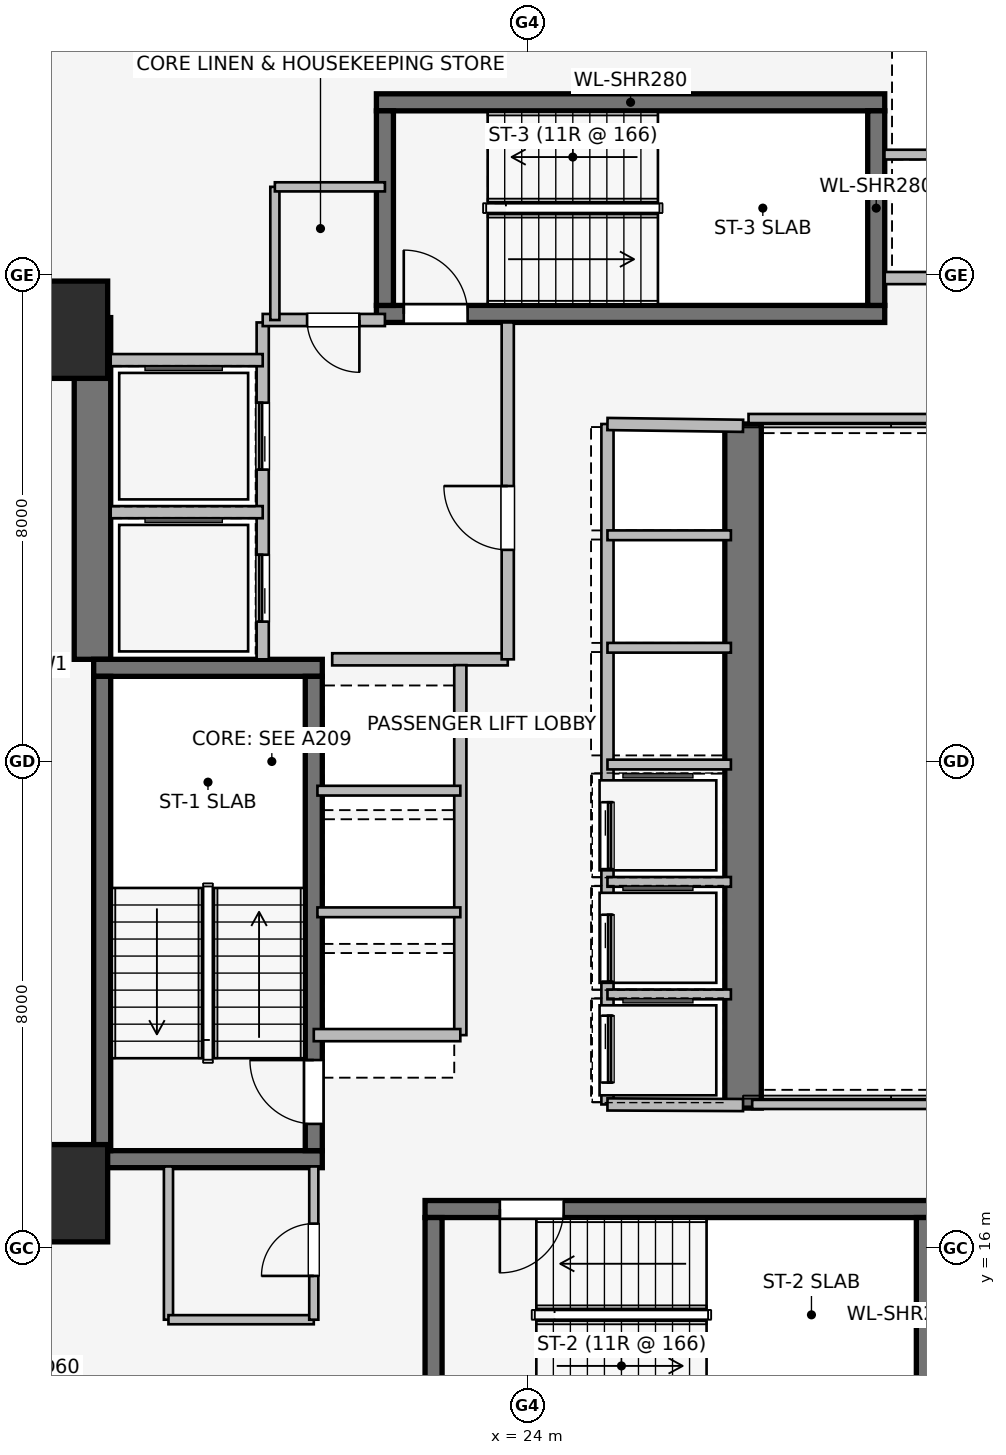
"""IFC4 building model, lengths in metres.
Left out: names, types, materials, properties, quantities, classifications, styles, units other than length and angle.
Written with IfcOpenShell. Run it as: python <this file> out.ifc"""

import sys

from ifc_helpers import new_model, si_unit, direction, frame, frame_2d, origin, origin_2d, place, context, subcontext, project, spatial, rectangle, extrude, element, fill, save


model = new_model("IFC4")
c1 = context("Model", 3, precision=1e-05, world=origin(), true_north=direction((0.0, 1.0)))
c2 = subcontext(c1, "Body", "Model", "MODEL_VIEW")
j1 = project(units=[si_unit("LENGTHUNIT", "METRE"), si_unit("PLANEANGLEUNIT", "RADIAN")], contexts=[c1])
p1 = place(None, origin())
s1 = spatial("IfcSite", under=j1, at=p1, CompositionType="ELEMENT")
p2 = place(p1, origin())
s2 = spatial("IfcBuilding", under=s1, at=p2, CompositionType="ELEMENT")
p3 = place(p2, frame((0.0, 0.0, 30.65)))
s3 = spatial("IfcBuildingStorey", under=s2, at=p3, CompositionType="ELEMENT", Elevation=30.65)
p4 = place(p3, frame((16.85, 25.68, 0.0), z_axis=(0.0, 0.0, 1.0), x_axis=(0.0, 1.0, 0.0)))
e1 = element("IfcWall", 1, at=p4, inside=s3, PredefinedType="SHEAR", context=c2, shape_type="SweptSolid", body=[
    extrude(rectangle(XDim=5.62, YDim=0.6, at=frame_2d((2.81, 0.0))), origin(), (0.0, 0.0, 1.0), 3.65),
])
p5 = place(p3, frame((27.55, 29.55, 0.0), z_axis=(0.0, 0.0, 1.0), x_axis=(0.0, -1.0, 0.0)))
e2 = element("IfcWall", 2, at=p5, inside=s3, PredefinedType="SHEAR", context=c2, shape_type="SweptSolid", body=[
    extrude(rectangle(XDim=11.25, YDim=0.6, at=frame_2d((5.625, 0.0))), origin(), (0.0, 0.0, 1.0), 3.65),
])
for number, where, z_axis, x_axis in (
    (3, (16.87, 17.46, 0.0), (0.0, 0.0, 1.0), (1.0, 0.0, 0.0)),
    (4, (20.63, 25.54, 0.0), (0.0, 0.0, 1.0), (-1.0, 0.0, 0.0)),
):
    element("IfcWall", number, at=place(p3, frame(where, z_axis=z_axis, x_axis=x_axis)), inside=s3, PredefinedType="SHEAR", context=c2, shape_type="SweptSolid", body=[
        extrude(rectangle(XDim=3.76, YDim=0.28, at=frame_2d((1.88, 0.0))), origin(), (0.0, 0.0, 1.0), 3.65),
    ])
p6 = place(p3, frame((17.01, 25.4, 0.0), z_axis=(0.0, 0.0, 1.0), x_axis=(0.0, -1.0, 0.0)))
e5 = element("IfcWall", 5, at=p6, inside=s3, PredefinedType="SHEAR", context=c2, shape_type="SweptSolid", body=[
    extrude(rectangle(XDim=7.8, YDim=0.28, at=frame_2d((3.9, 0.0))), origin(), (0.0, 0.0, 1.0), 3.65),
])
p7 = place(p3, frame((20.49, 17.6, 0.0), z_axis=(0.0, 0.0, 1.0), x_axis=(0.0, 1.0, 0.0)))
e6 = element("IfcWall", 6, at=p7, inside=s3, PredefinedType="SHEAR", context=c2, shape_type="SweptSolid", body=[
    extrude(rectangle(XDim=7.8, YDim=0.28, at=frame_2d((3.9, 0.0))), origin(), (0.0, 0.0, 1.0), 3.65),
])
p8 = place(p7, frame((0.44, 0.0, 0.0)))
e7 = element("IfcOpeningElement", 7, at=p8, cuts=e6, PredefinedType="OPENING", context=c2, shape_type="SweptSolid", body=[
    extrude(rectangle(XDim=1.05, YDim=2.0, at=frame_2d((0.525, 1.0))), frame((0.0, 0.15, 0.0), z_axis=(0.0, -1.0, 0.0), x_axis=(1.0, 0.0, 0.0)), (0.0, 0.0, 1.0), 0.3),
])
p9 = place(p3, frame((30.68, 16.64, 0.0), z_axis=(0.0, 0.0, 1.0), x_axis=(-1.0, 0.0, 0.0)))
e8 = element("IfcWall", 8, at=p9, inside=s3, PredefinedType="SHEAR", context=c2, shape_type="SweptSolid", body=[
    extrude(rectangle(XDim=8.36, YDim=0.28, at=frame_2d((4.18, 0.0))), origin(), (0.0, 0.0, 1.0), 3.65),
])
p10 = place(p9, frame((6.08, 0.0, 0.0)))
e9 = element("IfcOpeningElement", 9, at=p10, cuts=e8, PredefinedType="OPENING", context=c2, shape_type="SweptSolid", body=[
    extrude(rectangle(XDim=1.05, YDim=2.0, at=frame_2d((0.525, 1.0))), frame((0.0, 0.15, 0.0), z_axis=(0.0, -1.0, 0.0), x_axis=(1.0, 0.0, 0.0)), (0.0, 0.0, 1.0), 0.3),
])
for number, where, z_axis, x_axis in (
    (10, (22.46, 16.5, 0.0), (0.0, 0.0, 1.0), (0.0, -1.0, 0.0)),
    (11, (30.54, 13.3, 0.0), (0.0, 0.0, 1.0), (0.0, 1.0, 0.0)),
):
    element("IfcWall", number, at=place(p3, frame(where, z_axis=z_axis, x_axis=x_axis)), inside=s3, PredefinedType="SHEAR", context=c2, shape_type="SweptSolid", body=[
        extrude(rectangle(XDim=3.2, YDim=0.28, at=frame_2d((1.6, 0.0))), origin(), (0.0, 0.0, 1.0), 3.65),
    ])
p11 = place(p3, frame((21.52, 31.36, 0.0), z_axis=(0.0, 0.0, 1.0), x_axis=(1.0, 0.0, 0.0)))
e12 = element("IfcWall", 12, at=p11, inside=s3, PredefinedType="SHEAR", context=c2, shape_type="SweptSolid", body=[
    extrude(rectangle(XDim=8.36, YDim=0.28, at=frame_2d((4.18, 0.0))), origin(), (0.0, 0.0, 1.0), 3.65),
])
p12 = place(p11, frame((0.45, 0.0, 0.0)))
e13 = element("IfcOpeningElement", 13, at=p12, cuts=e12, PredefinedType="OPENING", context=c2, shape_type="SweptSolid", body=[
    extrude(rectangle(XDim=1.05, YDim=2.0, at=frame_2d((0.525, 1.0))), frame((0.0, 0.15, 0.0), z_axis=(0.0, -1.0, 0.0), x_axis=(1.0, 0.0, 0.0)), (0.0, 0.0, 1.0), 0.3),
])
p13 = place(p3, frame((29.88, 34.84, 0.0), z_axis=(0.0, 0.0, 1.0), x_axis=(-1.0, 0.0, 0.0)))
e14 = element("IfcWall", 14, at=p13, inside=s3, PredefinedType="SHEAR", context=c2, shape_type="SweptSolid", body=[
    extrude(rectangle(XDim=8.36, YDim=0.28, at=frame_2d((4.18, 0.0))), origin(), (0.0, 0.0, 1.0), 3.65),
])
for number, where, z_axis, x_axis in (
    (15, (21.66, 34.7, 0.0), (0.0, 0.0, 1.0), (0.0, -1.0, 0.0)),
    (16, (29.74, 31.5, 0.0), (0.0, 0.0, 1.0), (0.0, 1.0, 0.0)),
):
    element("IfcWall", number, at=place(p3, frame(where, z_axis=z_axis, x_axis=x_axis)), inside=s3, PredefinedType="SHEAR", context=c2, shape_type="SweptSolid", body=[
        extrude(rectangle(XDim=3.2, YDim=0.28, at=frame_2d((1.6, 0.0))), origin(), (0.0, 0.0, 1.0), 3.65),
    ])
for number, where, z_axis, x_axis in (
    (17, (16.3, 16.9, 0.0), (0.0, 0.0, 1.0), (1.0, 0.0, 0.0)),
    (18, (16.3, 31.1, 0.0), (0.0, 0.0, 1.0), (1.0, 0.0, 0.0)),
):
    element("IfcColumn", number, at=place(p3, frame(where, z_axis=z_axis, x_axis=x_axis)), inside=s3, PredefinedType="COLUMN", context=c2, shape_type="SweptSolid", body=[
        extrude(rectangle(XDim=1.6, YDim=1.6, at=origin_2d()), origin(), (0.0, 0.0, 1.0), 3.65),
    ])
p14 = place(p3, frame((19.65, 25.68, 0.0), z_axis=(0.0, 0.0, 1.0), x_axis=(0.0, 1.0, 0.0)))
e19 = element("IfcWall", 19, at=p14, inside=s3, PredefinedType="PARTITIONING", context=c2, shape_type="SweptSolid", body=[
    extrude(rectangle(XDim=5.54, YDim=0.2, at=frame_2d((2.77, 0.0))), origin(), (0.0, 0.0, 1.0), 3.39),
])
p15 = place(p14, frame((0.62, 0.0, 0.0)))
e20 = element("IfcOpeningElement", 20, at=p15, cuts=e19, PredefinedType="OPENING", context=c2, shape_type="SweptSolid", body=[
    extrude(rectangle(XDim=1.1, YDim=2.2, at=frame_2d((0.55, 1.1))), frame((0.0, 0.11, 0.0), z_axis=(0.0, -1.0, 0.0), x_axis=(1.0, 0.0, 0.0)), (0.0, 0.0, 1.0), 0.22),
])
p16 = place(p14, frame((3.12, 0.0, 0.0)))
e21 = element("IfcOpeningElement", 21, at=p16, cuts=e19, PredefinedType="OPENING", context=c2, shape_type="SweptSolid", body=[
    extrude(rectangle(XDim=1.1, YDim=2.2, at=frame_2d((0.55, 1.1))), frame((0.0, 0.11, 0.0), z_axis=(0.0, -1.0, 0.0), x_axis=(1.0, 0.0, 0.0)), (0.0, 0.0, 1.0), 0.22),
])
p17 = place(p3, frame((20.793, 25.68, 0.0), z_axis=(0.0, 0.0, 1.0), x_axis=(1.0, 0.0, 0.0)))
e22 = element("IfcWall", 22, at=p17, inside=s3, PredefinedType="PARTITIONING", context=c2, shape_type="SweptSolid", body=[
    extrude(rectangle(XDim=2.887, YDim=0.2, at=frame_2d((1.443, 0.0))), origin(), (0.0, 0.0, 1.0), 3.39),
])
p18 = place(p3, frame((23.68, 25.68, 0.0), z_axis=(0.0, 0.0, 1.0), x_axis=(0.0, 1.0, 0.0)))
e23 = element("IfcWall", 23, at=p18, inside=s3, PredefinedType="PARTITIONING", context=c2, shape_type="SweptSolid", body=[
    extrude(rectangle(XDim=5.54, YDim=0.2, at=frame_2d((2.77, 0.0))), origin(), (0.0, 0.0, 1.0), 3.39),
])
p19 = place(p18, frame((1.8, 0.0, 0.0)))
e24 = element("IfcOpeningElement", 24, at=p19, cuts=e23, PredefinedType="OPENING", context=c2, shape_type="SweptSolid", body=[
    extrude(rectangle(XDim=1.05, YDim=2.0, at=frame_2d((0.525, 1.0))), frame((0.0, 0.11, 0.0), z_axis=(0.0, -1.0, 0.0), x_axis=(1.0, 0.0, 0.0)), (0.0, 0.0, 1.0), 0.22),
])
p20 = place(p3, frame((21.66, 31.26, 0.0), z_axis=(0.0, 0.0, 1.0), x_axis=(-1.0, 0.0, 0.0)))
e25 = element("IfcWall", 25, at=p20, inside=s3, PredefinedType="PARTITIONING", context=c2, shape_type="SweptSolid", body=[
    extrude(rectangle(XDim=2.01, YDim=0.2, at=frame_2d((1.005, 0.0))), origin(), (0.0, 0.0, 1.0), 3.39),
])
p21 = place(p20, frame((0.42, 0.0, 0.0)))
e26 = element("IfcOpeningElement", 26, at=p21, cuts=e25, PredefinedType="OPENING", context=c2, shape_type="SweptSolid", body=[
    extrude(rectangle(XDim=0.86, YDim=2.0, at=frame_2d((0.43, 1.0))), frame((0.0, 0.11, 0.0), z_axis=(0.0, -1.0, 0.0), x_axis=(1.0, 0.0, 0.0)), (0.0, 0.0, 1.0), 0.22),
])
p22 = place(p3, frame((17.15, 28.1, 0.0), z_axis=(0.0, 0.0, 1.0), x_axis=(1.0, 0.0, 0.0)))
e27 = element("IfcWall", 27, at=p22, inside=s3, PredefinedType="PARTITIONING", context=c2, shape_type="SweptSolid", body=[
    extrude(rectangle(XDim=2.5, YDim=0.2, at=frame_2d((1.25, 0.0))), origin(), (0.0, 0.0, 1.0), 3.39),
])
p23 = place(p3, frame((19.65, 30.6, 0.0), z_axis=(0.0, 0.0, 1.0), x_axis=(-1.0, 0.0, 0.0)))
e28 = element("IfcWall", 28, at=p23, inside=s3, PredefinedType="PARTITIONING", context=c2, shape_type="SweptSolid", body=[
    extrude(rectangle(XDim=2.5, YDim=0.2, at=frame_2d((1.25, 0.0))), origin(), (0.0, 0.0, 1.0), 2.29),
])
p24 = place(p3, frame((32.48, 31.95, 0.0), z_axis=(0.0, 0.0, 1.0), x_axis=(-1.0, 0.0, 0.0)))
e29 = element("IfcWall", 29, at=p24, inside=s3, PredefinedType="PARTITIONING", context=c2, shape_type="SweptSolid", body=[
    extrude(rectangle(XDim=2.6, YDim=0.2, at=frame_2d((1.3, 0.0))), origin(), (0.0, 0.0, 1.0), 3.39),
])
p25 = place(p3, frame((29.875, 33.98, 0.0), z_axis=(0.0, 0.0, 1.0), x_axis=(1.0, 0.0, 0.0)))
e30 = element("IfcWall", 30, at=p25, inside=s3, PredefinedType="PARTITIONING", context=c2, shape_type="SweptSolid", body=[
    extrude(rectangle(XDim=2.605, YDim=0.16, at=frame_2d((1.302, 0.0))), origin(), (0.0, 0.0, 1.0), 3.39),
])
p26 = place(p3, frame((22.9, 19.5, 0.0), z_axis=(0.0, 0.0, 1.0), x_axis=(0.0, 1.0, 0.0)))
e31 = element("IfcWall", 31, at=p26, inside=s3, PredefinedType="PARTITIONING", context=c2, shape_type="SweptSolid", body=[
    extrude(rectangle(XDim=6.085, YDim=0.2, at=frame_2d((3.042, 0.0))), origin(), (0.0, 0.0, 1.0), 3.39),
])
p27 = place(p3, frame((20.49, 19.5, 0.0), z_axis=(0.0, 0.0, 1.0), x_axis=(1.0, 0.0, 0.0)))
e32 = element("IfcWall", 32, at=p27, inside=s3, PredefinedType="PARTITIONING", context=c2, shape_type="SweptSolid", body=[
    extrude(rectangle(XDim=2.41, YDim=0.2, at=frame_2d((1.205, 0.0))), origin(), (0.0, 0.0, 1.0), 2.29),
])
for number, where, z_axis, x_axis in (
    (33, (20.55, 21.52, 0.0), (0.0, 0.0, 1.0), (1.0, 0.0, 0.0)),
    (34, (20.55, 23.52, 0.0), (0.0, 0.0, 1.0), (1.0, 0.0, 0.0)),
):
    element("IfcWall", number, at=place(p3, frame(where, z_axis=z_axis, x_axis=x_axis)), inside=s3, PredefinedType="PARTITIONING", context=c2, shape_type="SweptSolid", body=[
        extrude(rectangle(XDim=2.35, YDim=0.16, at=frame_2d((1.175, 0.0))), origin(), (0.0, 0.0, 1.0), 3.39),
    ])
p28 = place(p3, frame((25.32, 29.55, 0.0), z_axis=(0.0, 0.0, 1.0), x_axis=(0.0, -1.0, 0.0)))
e35 = element("IfcWall", 35, at=p28, inside=s3, PredefinedType="PARTITIONING", context=c2, shape_type="SweptSolid", body=[
    extrude(rectangle(XDim=11.19, YDim=0.2, at=frame_2d((5.595, 0.0))), origin(), (0.0, 0.0, 1.0), 3.39),
])
p29 = place(p28, frame((6.22, 0.0, 0.0)))
e36 = element("IfcOpeningElement", 36, at=p29, cuts=e35, PredefinedType="OPENING", context=c2, shape_type="SweptSolid", body=[
    extrude(rectangle(XDim=1.1, YDim=2.2, at=frame_2d((0.55, 1.1))), frame((0.0, 0.11, 0.0), z_axis=(0.0, -1.0, 0.0), x_axis=(1.0, 0.0, 0.0)), (0.0, 0.0, 1.0), 0.22),
])
p30 = place(p28, frame((8.07, 0.0, 0.0)))
e37 = element("IfcOpeningElement", 37, at=p30, cuts=e35, PredefinedType="OPENING", context=c2, shape_type="SweptSolid", body=[
    extrude(rectangle(XDim=1.1, YDim=2.2, at=frame_2d((0.55, 1.1))), frame((0.0, 0.11, 0.0), z_axis=(0.0, -1.0, 0.0), x_axis=(1.0, 0.0, 0.0)), (0.0, 0.0, 1.0), 0.22),
])
p31 = place(p28, frame((9.73, 0.0, 0.0)))
e38 = element("IfcOpeningElement", 38, at=p31, cuts=e35, PredefinedType="OPENING", context=c2, shape_type="SweptSolid", body=[
    extrude(rectangle(XDim=1.1, YDim=2.2, at=frame_2d((0.55, 1.1))), frame((0.0, 0.11, 0.0), z_axis=(0.0, -1.0, 0.0), x_axis=(1.0, 0.0, 0.0)), (0.0, 0.0, 1.0), 0.22),
])
p32 = place(p3, frame((25.32, 18.36, 0.0), z_axis=(0.0, 0.0, 1.0), x_axis=(0.999989925833, -0.004488678231, 0.0)))
e39 = element("IfcWall", 39, at=p32, inside=s3, PredefinedType="PARTITIONING", context=c2, shape_type="SweptSolid", body=[
    extrude(rectangle(XDim=2.23, YDim=0.2, at=frame_2d((1.115, 0.0))), origin(), (0.0, 0.0, 1.0), 3.39),
])
p33 = place(p3, frame((27.55, 29.52, 0.0), z_axis=(0.0, 0.0, 1.0), x_axis=(-0.999909343457, 0.013464949556, 0.0)))
e40 = element("IfcWall", 40, at=p33, inside=s3, PredefinedType="PARTITIONING", context=c2, shape_type="SweptSolid", body=[
    extrude(rectangle(XDim=2.23, YDim=0.2, at=frame_2d((1.115, 0.0))), origin(), (0.0, 0.0, 1.0), 2.29),
])
for number, where, z_axis, x_axis in (
    (41, (25.32, 20.17, 0.0), (0.0, 0.0, 1.0), (1.0, 0.0, 0.0)),
    (42, (25.32, 22.02, 0.0), (0.0, 0.0, 1.0), (1.0, 0.0, 0.0)),
    (43, (25.32, 23.95, 0.0), (0.0, 0.0, 1.0), (1.0, 0.0, 0.0)),
    (44, (25.32, 25.87, 0.0), (0.0, 0.0, 1.0), (1.0, 0.0, 0.0)),
    (45, (25.32, 27.72, 0.0), (0.0, 0.0, 1.0), (1.0, 0.0, 0.0)),
):
    element("IfcWall", number, at=place(p3, frame(where, z_axis=z_axis, x_axis=x_axis)), inside=s3, PredefinedType="PARTITIONING", context=c2, shape_type="SweptSolid", body=[
        extrude(rectangle(XDim=2.03, YDim=0.16, at=frame_2d((1.015, 0.0))), origin(), (0.0, 0.0, 1.0), 3.39),
    ])
p34 = place(p3, frame((18.1, 17.34, 0.0), z_axis=(0.0, 0.0, 1.0), x_axis=(0.0, -1.0, 0.0)))
e46 = element("IfcWall", 46, at=p34, inside=s3, PredefinedType="PARTITIONING", context=c2, shape_type="SweptSolid", body=[
    extrude(rectangle(XDim=2.52, YDim=0.15, at=frame_2d((1.26, 0.0))), origin(), (0.0, 0.0, 1.0), 3.39),
])
p35 = place(p3, frame((18.1, 14.82, 0.0), z_axis=(0.0, 0.0, 1.0), x_axis=(1.0, 0.0, 0.0)))
e47 = element("IfcWall", 47, at=p35, inside=s3, PredefinedType="PARTITIONING", context=c2, shape_type="SweptSolid", body=[
    extrude(rectangle(XDim=2.39, YDim=0.15, at=frame_2d((1.195, 0.0))), origin(), (0.0, 0.0, 1.0), 3.39),
])
p36 = place(p3, frame((20.49, 14.82, 0.0), z_axis=(0.0, 0.0, 1.0), x_axis=(0.0, 1.0, 0.0)))
e48 = element("IfcWall", 48, at=p36, inside=s3, PredefinedType="PARTITIONING", context=c2, shape_type="SweptSolid", body=[
    extrude(rectangle(XDim=2.52, YDim=0.15, at=frame_2d((1.26, 0.0))), origin(), (0.0, 0.0, 1.0), 3.39),
])
p37 = place(p36, frame((0.72, 0.0, 0.0)))
e49 = element("IfcOpeningElement", 49, at=p37, cuts=e48, PredefinedType="OPENING", context=c2, shape_type="SweptSolid", body=[
    extrude(rectangle(XDim=0.86, YDim=2.0, at=frame_2d((0.43, 1.0))), frame((0.0, 0.085, 0.0), z_axis=(0.0, -1.0, 0.0), x_axis=(1.0, 0.0, 0.0)), (0.0, 0.0, 1.0), 0.17),
])
p38 = place(p3, frame((19.85, 33.45, 0.0), z_axis=(0.0, 0.0, 1.0), x_axis=(0.0, -1.0, 0.0)))
e50 = element("IfcWall", 50, at=p38, inside=s3, PredefinedType="PARTITIONING", context=c2, shape_type="SweptSolid", body=[
    extrude(rectangle(XDim=2.19, YDim=0.15, at=frame_2d((1.095, 0.0))), origin(), (0.0, 0.0, 1.0), 3.39),
])
p39 = place(p3, frame((21.66, 33.45, 0.0), z_axis=(0.0, 0.0, 1.0), x_axis=(-1.0, 0.0, 0.0)))
e51 = element("IfcWall", 51, at=p39, inside=s3, PredefinedType="PARTITIONING", context=c2, shape_type="SweptSolid", body=[
    extrude(rectangle(XDim=1.81, YDim=0.15, at=frame_2d((0.905, 0.0))), origin(), (0.0, 0.0, 1.0), 3.39),
])
p40 = place(p3, frame((27.7, 18.36, 0.0), z_axis=(0.0, 0.0, 1.0), x_axis=(1.0, 0.0, 0.0)))
e52 = element("IfcWall", 52, at=p40, inside=s3, PredefinedType="PARTITIONING", context=c2, shape_type="SweptSolid", body=[
    extrude(rectangle(XDim=12.14, YDim=0.15, at=frame_2d((6.07, 0.0))), origin(), (0.0, 0.0, 1.0), 2.531),
])
p41 = place(p3, frame((39.84, 29.64, 0.0), z_axis=(0.0, 0.0, 1.0), x_axis=(-1.0, 0.0, 0.0)))
e53 = element("IfcWall", 53, at=p41, inside=s3, PredefinedType="PARTITIONING", context=c2, shape_type="SweptSolid", body=[
    extrude(rectangle(XDim=12.2, YDim=0.15, at=frame_2d((6.1, 0.0))), origin(), (0.0, 0.0, 1.0), 2.531),
])
p42 = place(p8, origin())
e54 = element("IfcDoor", 54, at=p42, inside=s3, OperationType="SINGLE_SWING_RIGHT", PredefinedType="DOOR", context=c2, shape_type="SweptSolid", body=[
    extrude(rectangle(XDim=1.05, YDim=2.0, at=frame_2d((0.525, 1.0))), frame((0.0, 0.025, 0.0), z_axis=(0.0, -1.0, 0.0), x_axis=(1.0, 0.0, 0.0)), (0.0, 0.0, 1.0), 0.05),
])
fill(e7, e54)
p43 = place(p10, origin())
e55 = element("IfcDoor", 55, at=p43, inside=s3, OperationType="SINGLE_SWING_RIGHT", PredefinedType="DOOR", context=c2, shape_type="SweptSolid", body=[
    extrude(rectangle(XDim=1.05, YDim=2.0, at=frame_2d((0.525, 1.0))), frame((0.0, 0.025, 0.0), z_axis=(0.0, -1.0, 0.0), x_axis=(1.0, 0.0, 0.0)), (0.0, 0.0, 1.0), 0.05),
])
fill(e9, e55)
p44 = place(p12, origin())
e56 = element("IfcDoor", 56, at=p44, inside=s3, OperationType="SINGLE_SWING_LEFT", PredefinedType="DOOR", context=c2, shape_type="SweptSolid", body=[
    extrude(rectangle(XDim=1.05, YDim=2.0, at=frame_2d((0.525, 1.0))), frame((0.0, 0.025, 0.0), z_axis=(0.0, -1.0, 0.0), x_axis=(1.0, 0.0, 0.0)), (0.0, 0.0, 1.0), 0.05),
])
fill(e13, e56)
p45 = place(p15, origin())
e57 = element("IfcDoor", 57, at=p45, inside=s3, OperationType="SLIDING_TO_LEFT", PredefinedType="DOOR", context=c2, shape_type="SweptSolid", body=[
    extrude(rectangle(XDim=1.1, YDim=2.2, at=frame_2d((0.55, 1.1))), frame((0.0, 0.025, 0.0), z_axis=(0.0, -1.0, 0.0), x_axis=(1.0, 0.0, 0.0)), (0.0, 0.0, 1.0), 0.05),
])
fill(e20, e57)
p46 = place(p16, origin())
e58 = element("IfcDoor", 58, at=p46, inside=s3, OperationType="SLIDING_TO_LEFT", PredefinedType="DOOR", context=c2, shape_type="SweptSolid", body=[
    extrude(rectangle(XDim=1.1, YDim=2.2, at=frame_2d((0.55, 1.1))), frame((0.0, 0.025, 0.0), z_axis=(0.0, -1.0, 0.0), x_axis=(1.0, 0.0, 0.0)), (0.0, 0.0, 1.0), 0.05),
])
fill(e21, e58)
p47 = place(p19, origin())
e59 = element("IfcDoor", 59, at=p47, inside=s3, OperationType="SINGLE_SWING_RIGHT", PredefinedType="DOOR", context=c2, shape_type="SweptSolid", body=[
    extrude(rectangle(XDim=1.05, YDim=2.0, at=frame_2d((0.525, 1.0))), frame((0.0, 0.025, 0.0), z_axis=(0.0, -1.0, 0.0), x_axis=(1.0, 0.0, 0.0)), (0.0, 0.0, 1.0), 0.05),
])
fill(e24, e59)
p48 = place(p21, origin())
e60 = element("IfcDoor", 60, at=p48, inside=s3, OperationType="SINGLE_SWING_LEFT", PredefinedType="DOOR", context=c2, shape_type="SweptSolid", body=[
    extrude(rectangle(XDim=0.86, YDim=2.0, at=frame_2d((0.43, 1.0))), frame((0.0, 0.025, 0.0), z_axis=(0.0, -1.0, 0.0), x_axis=(1.0, 0.0, 0.0)), (0.0, 0.0, 1.0), 0.05),
])
fill(e26, e60)
p49 = place(p29, origin())
e61 = element("IfcDoor", 61, at=p49, inside=s3, OperationType="SLIDING_TO_LEFT", PredefinedType="DOOR", context=c2, shape_type="SweptSolid", body=[
    extrude(rectangle(XDim=1.1, YDim=2.2, at=frame_2d((0.55, 1.1))), frame((0.0, 0.025, 0.0), z_axis=(0.0, -1.0, 0.0), x_axis=(1.0, 0.0, 0.0)), (0.0, 0.0, 1.0), 0.05),
])
fill(e36, e61)
p50 = place(p30, origin())
e62 = element("IfcDoor", 62, at=p50, inside=s3, OperationType="SLIDING_TO_LEFT", PredefinedType="DOOR", context=c2, shape_type="SweptSolid", body=[
    extrude(rectangle(XDim=1.1, YDim=2.2, at=frame_2d((0.55, 1.1))), frame((0.0, 0.025, 0.0), z_axis=(0.0, -1.0, 0.0), x_axis=(1.0, 0.0, 0.0)), (0.0, 0.0, 1.0), 0.05),
])
fill(e37, e62)
p51 = place(p31, origin())
e63 = element("IfcDoor", 63, at=p51, inside=s3, OperationType="SLIDING_TO_LEFT", PredefinedType="DOOR", context=c2, shape_type="SweptSolid", body=[
    extrude(rectangle(XDim=1.1, YDim=2.2, at=frame_2d((0.55, 1.1))), frame((0.0, 0.025, 0.0), z_axis=(0.0, -1.0, 0.0), x_axis=(1.0, 0.0, 0.0)), (0.0, 0.0, 1.0), 0.05),
])
fill(e38, e63)
p52 = place(p37, origin())
e64 = element("IfcDoor", 64, at=p52, inside=s3, OperationType="SINGLE_SWING_LEFT", PredefinedType="DOOR", context=c2, shape_type="SweptSolid", body=[
    extrude(rectangle(XDim=0.86, YDim=2.0, at=frame_2d((0.43, 1.0))), frame((0.0, 0.025, 0.0), z_axis=(0.0, -1.0, 0.0), x_axis=(1.0, 0.0, 0.0)), (0.0, 0.0, 1.0), 0.05),
])
fill(e49, e64)
save(model, sys.argv[1])
